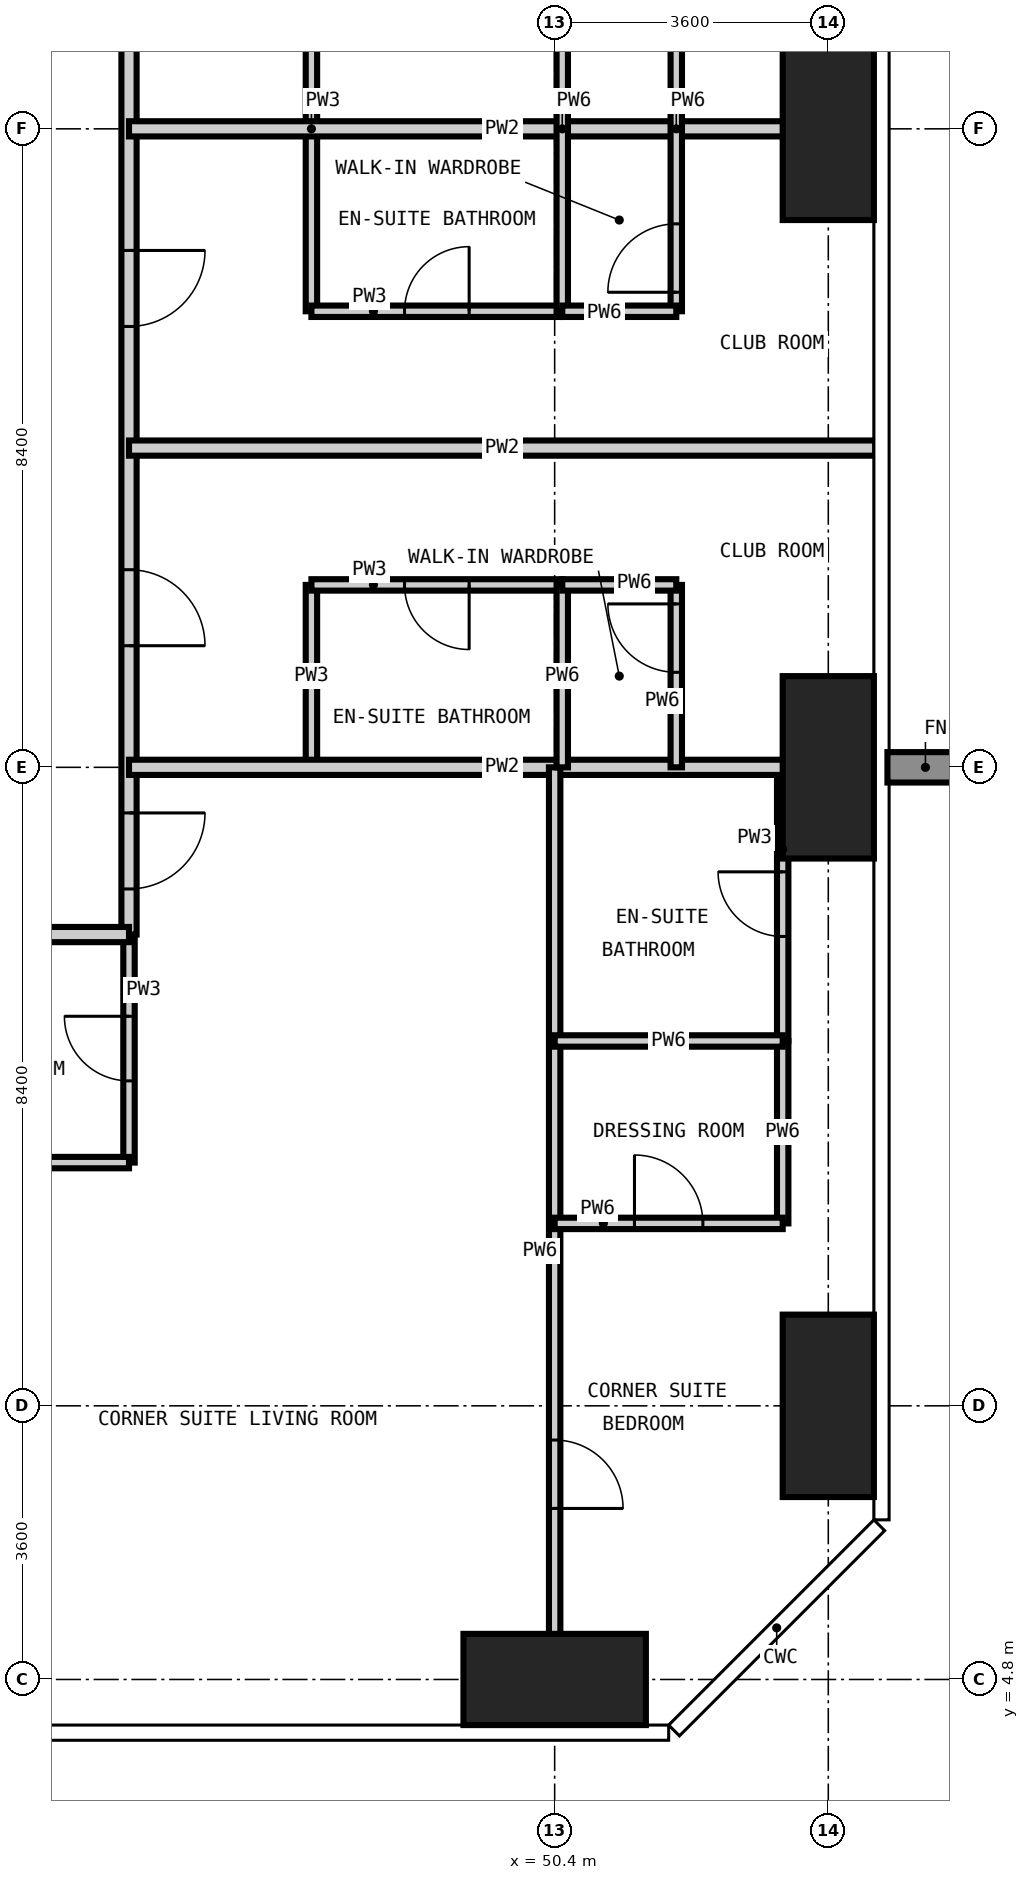
"""IFC4 building model, lengths in metres.
Left out: names, types, materials, properties, quantities, classifications, styles, units other than length and angle.
Written with IfcOpenShell. Run it as: python <this file> out.ifc"""

import sys

from ifc_helpers import new_model, si_unit, direction, frame, frame_2d, origin, origin_2d, place, context, subcontext, project, spatial, rectangle, extrude, element, fill, save


model = new_model("IFC4")
c1 = context("Model", 3, precision=1e-05, world=origin(), true_north=direction((0.0, 1.0)))
c2 = subcontext(c1, "Body", "Model", "MODEL_VIEW")
j1 = project(units=[si_unit("LENGTHUNIT", "METRE"), si_unit("PLANEANGLEUNIT", "RADIAN")], contexts=[c1])
p1 = place(None, origin())
s1 = spatial("IfcSite", under=j1, at=p1, CompositionType="ELEMENT")
p2 = place(p1, origin())
s2 = spatial("IfcBuilding", under=s1, at=p2, CompositionType="ELEMENT")
p3 = place(p2, frame((0.0, 0.0, 180.6)))
s3 = spatial("IfcBuildingStorey", under=s2, at=p3, CompositionType="ELEMENT", Elevation=180.6)
p4 = place(p3, frame((50.4, 4.8, -0.35), z_axis=(0.0, 0.0, 1.0), x_axis=(1.0, 0.0, 0.0)))
e1 = element("IfcColumn", 1, at=p4, inside=s3, PredefinedType="COLUMN", context=c2, shape_type="SweptSolid", body=[
    extrude(rectangle(XDim=2.4, YDim=1.2, at=origin_2d()), origin(), (0.0, 0.0, 1.0), 3.6),
])
for number, where, z_axis, x_axis in (
    (2, (54.0, 8.4, -0.35), (0.0, 0.0, 1.0), (1.0, 0.0, 0.0)),
    (3, (54.0, 16.8, -0.35), (0.0, 0.0, 1.0), (1.0, 0.0, 0.0)),
    (4, (54.0, 25.2, -0.35), (0.0, 0.0, 1.0), (1.0, 0.0, 0.0)),
):
    element("IfcColumn", number, at=place(p3, frame(where, z_axis=z_axis, x_axis=x_axis)), inside=s3, PredefinedType="COLUMN", context=c2, shape_type="SweptSolid", body=[
        extrude(rectangle(XDim=1.2, YDim=2.4, at=origin_2d()), origin(), (0.0, 0.0, 1.0), 3.6),
    ])
p5 = place(p3, frame((44.8, 11.6, 0.0), z_axis=(0.0, 0.0, 1.0), x_axis=(0.0, 1.0, 0.0)))
e5 = element("IfcWall", 5, at=p5, inside=s3, PredefinedType="PARTITIONING", context=c2, shape_type="SweptSolid", body=[
    extrude(rectangle(XDim=3.0, YDim=0.15, at=frame_2d((1.5, 0.0))), origin(), (0.0, 0.0, 1.0), 3.25),
])
p6 = place(p5, frame((1.075, 0.0, 0.0)))
e6 = element("IfcOpeningElement", 6, at=p6, cuts=e5, PredefinedType="OPENING", context=c2, shape_type="SweptSolid", body=[
    extrude(rectangle(XDim=0.85, YDim=2.1, at=frame_2d((0.425, 1.05))), frame((0.0, 0.085, 0.0), z_axis=(0.0, -1.0, 0.0), x_axis=(1.0, 0.0, 0.0)), (0.0, 0.0, 1.0), 0.17),
])
p7 = place(p3, frame((47.2, 16.8, 0.0), z_axis=(0.0, 0.0, 1.0), x_axis=(0.0, 1.0, 0.0)))
e7 = element("IfcWall", 7, at=p7, inside=s3, PredefinedType="PARTITIONING", context=c2, shape_type="SweptSolid", body=[
    extrude(rectangle(XDim=2.4, YDim=0.15, at=frame_2d((1.2, 0.0))), origin(), (0.0, 0.0, 1.0), 3.25),
])
p8 = place(p3, frame((47.2, 22.8, 0.0), z_axis=(0.0, 0.0, 1.0), x_axis=(0.0, 1.0, 0.0)))
e8 = element("IfcWall", 8, at=p8, inside=s3, PredefinedType="PARTITIONING", context=c2, shape_type="SweptSolid", body=[
    extrude(rectangle(XDim=4.8, YDim=0.15, at=frame_2d((2.4, 0.0))), origin(), (0.0, 0.0, 1.0), 3.25),
])
p9 = place(p3, frame((53.4, 13.2, 0.0), z_axis=(0.0, 0.0, 1.0), x_axis=(0.0, 1.0, 0.0)))
e9 = element("IfcWall", 9, at=p9, inside=s3, PredefinedType="PARTITIONING", context=c2, shape_type="SweptSolid", body=[
    extrude(rectangle(XDim=3.6, YDim=0.15, at=frame_2d((1.8, 0.0))), origin(), (0.0, 0.0, 1.0), 3.25),
])
p10 = place(p9, frame((1.375, 0.0, 0.0)))
e10 = element("IfcOpeningElement", 10, at=p10, cuts=e9, PredefinedType="OPENING", context=c2, shape_type="SweptSolid", body=[
    extrude(rectangle(XDim=0.85, YDim=2.1, at=frame_2d((0.425, 1.05))), frame((0.0, 0.085, 0.0), z_axis=(0.0, -1.0, 0.0), x_axis=(1.0, 0.0, 0.0)), (0.0, 0.0, 1.0), 0.17),
])
p11 = place(p3, frame((42.0, 11.6, 0.0), z_axis=(0.0, 0.0, 1.0), x_axis=(1.0, 0.0, 0.0)))
e11 = element("IfcWall", 11, at=p11, inside=s3, PredefinedType="PARTITIONING", context=c2, shape_type="SweptSolid", body=[
    extrude(rectangle(XDim=2.8, YDim=0.15, at=frame_2d((1.4, 0.0))), origin(), (0.0, 0.0, 1.0), 3.25),
])
p12 = place(p3, frame((47.2, 19.2, 0.0), z_axis=(0.0, 0.0, 1.0), x_axis=(1.0, 0.0, 0.0)))
e12 = element("IfcWall", 12, at=p12, inside=s3, PredefinedType="PARTITIONING", context=c2, shape_type="SweptSolid", body=[
    extrude(rectangle(XDim=3.3, YDim=0.15, at=frame_2d((1.65, 0.0))), origin(), (0.0, 0.0, 1.0), 3.25),
])
p13 = place(p12, frame((1.225, 0.0, 0.0)))
e13 = element("IfcOpeningElement", 13, at=p13, cuts=e12, PredefinedType="OPENING", context=c2, shape_type="SweptSolid", body=[
    extrude(rectangle(XDim=0.85, YDim=2.1, at=frame_2d((0.425, 1.05))), frame((0.0, 0.085, 0.0), z_axis=(0.0, -1.0, 0.0), x_axis=(1.0, 0.0, 0.0)), (0.0, 0.0, 1.0), 0.17),
])
p14 = place(p3, frame((47.2, 22.8, 0.0), z_axis=(0.0, 0.0, 1.0), x_axis=(1.0, 0.0, 0.0)))
e14 = element("IfcWall", 14, at=p14, inside=s3, PredefinedType="PARTITIONING", context=c2, shape_type="SweptSolid", body=[
    extrude(rectangle(XDim=3.3, YDim=0.15, at=frame_2d((1.65, 0.0))), origin(), (0.0, 0.0, 1.0), 3.25),
])
p15 = place(p14, frame((1.225, 0.0, 0.0)))
e15 = element("IfcOpeningElement", 15, at=p15, cuts=e14, PredefinedType="OPENING", context=c2, shape_type="SweptSolid", body=[
    extrude(rectangle(XDim=0.85, YDim=2.1, at=frame_2d((0.425, 1.05))), frame((0.0, 0.085, 0.0), z_axis=(0.0, -1.0, 0.0), x_axis=(1.0, 0.0, 0.0)), (0.0, 0.0, 1.0), 0.17),
])
p16 = place(p3, frame((44.8, 45.4, 0.0), z_axis=(0.0, 0.0, 1.0), x_axis=(0.0, -1.0, 0.0)))
e16 = element("IfcWall", 16, at=p16, inside=s3, PredefinedType="PARTITIONING", context=c2, shape_type="SweptSolid", body=[
    extrude(rectangle(XDim=30.8, YDim=0.2, at=frame_2d((15.4, 0.0))), origin(), (0.0, 0.0, 1.0), 3.25),
])
p17 = place(p16, frame((26.0, 0.0, 0.0)))
e17 = element("IfcOpeningElement", 17, at=p17, cuts=e16, PredefinedType="OPENING", context=c2, shape_type="SweptSolid", body=[
    extrude(rectangle(XDim=1.0, YDim=2.2, at=frame_2d((0.5, 1.1))), frame((0.0, 0.11, 0.0), z_axis=(0.0, -1.0, 0.0), x_axis=(1.0, 0.0, 0.0)), (0.0, 0.0, 1.0), 0.22),
])
p18 = place(p16, frame((21.8, 0.0, 0.0)))
e18 = element("IfcOpeningElement", 18, at=p18, cuts=e16, PredefinedType="OPENING", context=c2, shape_type="SweptSolid", body=[
    extrude(rectangle(XDim=1.0, YDim=2.2, at=frame_2d((0.5, 1.1))), frame((0.0, 0.11, 0.0), z_axis=(0.0, -1.0, 0.0), x_axis=(1.0, 0.0, 0.0)), (0.0, 0.0, 1.0), 0.22),
])
p19 = place(p16, frame((17.6, 0.0, 0.0)))
e19 = element("IfcOpeningElement", 19, at=p19, cuts=e16, PredefinedType="OPENING", context=c2, shape_type="SweptSolid", body=[
    extrude(rectangle(XDim=1.0, YDim=2.2, at=frame_2d((0.5, 1.1))), frame((0.0, 0.11, 0.0), z_axis=(0.0, -1.0, 0.0), x_axis=(1.0, 0.0, 0.0)), (0.0, 0.0, 1.0), 0.22),
])
p20 = place(p16, frame((13.4, 0.0, 0.0)))
e20 = element("IfcOpeningElement", 20, at=p20, cuts=e16, PredefinedType="OPENING", context=c2, shape_type="SweptSolid", body=[
    extrude(rectangle(XDim=1.0, YDim=2.2, at=frame_2d((0.5, 1.1))), frame((0.0, 0.11, 0.0), z_axis=(0.0, -1.0, 0.0), x_axis=(1.0, 0.0, 0.0)), (0.0, 0.0, 1.0), 0.22),
])
p21 = place(p16, frame((9.2, 0.0, 0.0)))
e21 = element("IfcOpeningElement", 21, at=p21, cuts=e16, PredefinedType="OPENING", context=c2, shape_type="SweptSolid", body=[
    extrude(rectangle(XDim=1.0, YDim=2.2, at=frame_2d((0.5, 1.1))), frame((0.0, 0.11, 0.0), z_axis=(0.0, -1.0, 0.0), x_axis=(1.0, 0.0, 0.0)), (0.0, 0.0, 1.0), 0.22),
])
p22 = place(p16, frame((5.0, 0.0, 0.0)))
e22 = element("IfcOpeningElement", 22, at=p22, cuts=e16, PredefinedType="OPENING", context=c2, shape_type="SweptSolid", body=[
    extrude(rectangle(XDim=1.0, YDim=2.2, at=frame_2d((0.5, 1.1))), frame((0.0, 0.11, 0.0), z_axis=(0.0, -1.0, 0.0), x_axis=(1.0, 0.0, 0.0)), (0.0, 0.0, 1.0), 0.22),
])
p23 = place(p16, frame((29.2, 0.0, 0.0)))
e23 = element("IfcOpeningElement", 23, at=p23, cuts=e16, PredefinedType="OPENING", context=c2, shape_type="SweptSolid", body=[
    extrude(rectangle(XDim=1.0, YDim=2.2, at=frame_2d((0.5, 1.1))), frame((0.0, 0.11, 0.0), z_axis=(0.0, -1.0, 0.0), x_axis=(1.0, 0.0, 0.0)), (0.0, 0.0, 1.0), 0.22),
])
p24 = place(p16, frame((1.2, 0.0, 0.0)))
e24 = element("IfcOpeningElement", 24, at=p24, cuts=e16, PredefinedType="OPENING", context=c2, shape_type="SweptSolid", body=[
    extrude(rectangle(XDim=1.0, YDim=2.2, at=frame_2d((0.5, 1.1))), frame((0.0, 0.11, 0.0), z_axis=(0.0, -1.0, 0.0), x_axis=(1.0, 0.0, 0.0)), (0.0, 0.0, 1.0), 0.22),
])
p25 = place(p3, frame((44.8, 14.6, 0.0), z_axis=(0.0, 0.0, 1.0), x_axis=(-1.0, 0.0, 0.0)))
e25 = element("IfcWall", 25, at=p25, inside=s3, PredefinedType="PARTITIONING", context=c2, shape_type="SweptSolid", body=[
    extrude(rectangle(XDim=30.2, YDim=0.2, at=frame_2d((15.1, 0.0))), origin(), (0.0, 0.0, 1.0), 3.25),
])
p26 = place(p25, frame((24.5, 0.0, 0.0)))
e26 = element("IfcOpeningElement", 26, at=p26, cuts=e25, PredefinedType="OPENING", context=c2, shape_type="SweptSolid", body=[
    extrude(rectangle(XDim=1.0, YDim=2.2, at=frame_2d((0.5, 1.1))), frame((0.0, 0.11, 0.0), z_axis=(0.0, -1.0, 0.0), x_axis=(1.0, 0.0, 0.0)), (0.0, 0.0, 1.0), 0.22),
])
p27 = place(p25, frame((13.7, 0.0, 0.0)))
e27 = element("IfcOpeningElement", 27, at=p27, cuts=e25, PredefinedType="OPENING", context=c2, shape_type="SweptSolid", body=[
    extrude(rectangle(XDim=1.0, YDim=2.2, at=frame_2d((0.5, 1.1))), frame((0.0, 0.11, 0.0), z_axis=(0.0, -1.0, 0.0), x_axis=(1.0, 0.0, 0.0)), (0.0, 0.0, 1.0), 0.22),
])
p28 = place(p25, frame((7.7, 0.0, 0.0)))
e28 = element("IfcOpeningElement", 28, at=p28, cuts=e25, PredefinedType="OPENING", context=c2, shape_type="SweptSolid", body=[
    extrude(rectangle(XDim=1.0, YDim=2.2, at=frame_2d((0.5, 1.1))), frame((0.0, 0.11, 0.0), z_axis=(0.0, -1.0, 0.0), x_axis=(1.0, 0.0, 0.0)), (0.0, 0.0, 1.0), 0.22),
])
for number, where, z_axis, x_axis in (
    (29, (44.8, 16.8, 0.0), (0.0, 0.0, 1.0), (1.0, 0.0, 0.0)),
    (30, (44.8, 21.0, 0.0), (0.0, 0.0, 1.0), (1.0, 0.0, 0.0)),
    (31, (44.8, 25.2, 0.0), (0.0, 0.0, 1.0), (1.0, 0.0, 0.0)),
):
    element("IfcWall", number, at=place(p3, frame(where, z_axis=z_axis, x_axis=x_axis)), inside=s3, PredefinedType="PARTITIONING", context=c2, shape_type="SweptSolid", body=[
        extrude(rectangle(XDim=9.818, YDim=0.2, at=frame_2d((4.909, 0.0))), origin(), (0.0, 0.0, 1.0), 3.25),
    ])
p29 = place(p3, frame((50.4, 4.182, 0.0), z_axis=(0.0, 0.0, 1.0), x_axis=(0.0, 1.0, 0.0)))
e32 = element("IfcWall", 32, at=p29, inside=s3, PredefinedType="PARTITIONING", context=c2, shape_type="SweptSolid", body=[
    extrude(rectangle(XDim=12.618, YDim=0.15, at=frame_2d((6.309, 0.0))), origin(), (0.0, 0.0, 1.0), 3.25),
])
p30 = place(p29, frame((2.868, 0.0, 0.0)))
e33 = element("IfcOpeningElement", 33, at=p30, cuts=e32, PredefinedType="OPENING", context=c2, shape_type="SweptSolid", body=[
    extrude(rectangle(XDim=0.9, YDim=2.1, at=frame_2d((0.45, 1.05))), frame((0.0, 0.085, 0.0), z_axis=(0.0, -1.0, 0.0), x_axis=(1.0, 0.0, 0.0)), (0.0, 0.0, 1.0), 0.17),
])
p31 = place(p3, frame((50.5, 16.8, 0.0), z_axis=(0.0, 0.0, 1.0), x_axis=(0.0, 1.0, 0.0)))
e34 = element("IfcWall", 34, at=p31, inside=s3, PredefinedType="PARTITIONING", context=c2, shape_type="SweptSolid", body=[
    extrude(rectangle(XDim=2.4, YDim=0.15, at=frame_2d((1.2, 0.0))), origin(), (0.0, 0.0, 1.0), 3.25),
])
p32 = place(p3, frame((50.5, 22.8, 0.0), z_axis=(0.0, 0.0, 1.0), x_axis=(0.0, 1.0, 0.0)))
e35 = element("IfcWall", 35, at=p32, inside=s3, PredefinedType="PARTITIONING", context=c2, shape_type="SweptSolid", body=[
    extrude(rectangle(XDim=4.8, YDim=0.15, at=frame_2d((2.4, 0.0))), origin(), (0.0, 0.0, 1.0), 3.25),
])
p33 = place(p3, frame((52.0, 16.8, 0.0), z_axis=(0.0, 0.0, 1.0), x_axis=(0.0, 1.0, 0.0)))
e36 = element("IfcWall", 36, at=p33, inside=s3, PredefinedType="PARTITIONING", context=c2, shape_type="SweptSolid", body=[
    extrude(rectangle(XDim=2.4, YDim=0.15, at=frame_2d((1.2, 0.0))), origin(), (0.0, 0.0, 1.0), 3.25),
])
p34 = place(p33, frame((1.25, 0.0, 0.0)))
e37 = element("IfcOpeningElement", 37, at=p34, cuts=e36, PredefinedType="OPENING", context=c2, shape_type="SweptSolid", body=[
    extrude(rectangle(XDim=0.9, YDim=2.1, at=frame_2d((0.45, 1.05))), frame((0.0, 0.085, 0.0), z_axis=(0.0, -1.0, 0.0), x_axis=(1.0, 0.0, 0.0)), (0.0, 0.0, 1.0), 0.17),
])
p35 = place(p3, frame((52.0, 22.8, 0.0), z_axis=(0.0, 0.0, 1.0), x_axis=(0.0, 1.0, 0.0)))
e38 = element("IfcWall", 38, at=p35, inside=s3, PredefinedType="PARTITIONING", context=c2, shape_type="SweptSolid", body=[
    extrude(rectangle(XDim=4.8, YDim=0.15, at=frame_2d((2.4, 0.0))), origin(), (0.0, 0.0, 1.0), 3.25),
])
p36 = place(p35, frame((0.25, 0.0, 0.0)))
e39 = element("IfcOpeningElement", 39, at=p36, cuts=e38, PredefinedType="OPENING", context=c2, shape_type="SweptSolid", body=[
    extrude(rectangle(XDim=0.9, YDim=2.1, at=frame_2d((0.45, 1.05))), frame((0.0, 0.085, 0.0), z_axis=(0.0, -1.0, 0.0), x_axis=(1.0, 0.0, 0.0)), (0.0, 0.0, 1.0), 0.17),
])
p37 = place(p35, frame((3.65, 0.0, 0.0)))
e40 = element("IfcOpeningElement", 40, at=p37, cuts=e38, PredefinedType="OPENING", context=c2, shape_type="SweptSolid", body=[
    extrude(rectangle(XDim=0.9, YDim=2.1, at=frame_2d((0.45, 1.05))), frame((0.0, 0.085, 0.0), z_axis=(0.0, -1.0, 0.0), x_axis=(1.0, 0.0, 0.0)), (0.0, 0.0, 1.0), 0.17),
])
p38 = place(p3, frame((53.4, 10.8, 0.0), z_axis=(0.0, 0.0, 1.0), x_axis=(0.0, 1.0, 0.0)))
e41 = element("IfcWall", 41, at=p38, inside=s3, PredefinedType="PARTITIONING", context=c2, shape_type="SweptSolid", body=[
    extrude(rectangle(XDim=2.4, YDim=0.15, at=frame_2d((1.2, 0.0))), origin(), (0.0, 0.0, 1.0), 3.25),
])
p39 = place(p3, frame((50.4, 10.8, 0.0), z_axis=(0.0, 0.0, 1.0), x_axis=(1.0, 0.0, 0.0)))
e42 = element("IfcWall", 42, at=p39, inside=s3, PredefinedType="PARTITIONING", context=c2, shape_type="SweptSolid", body=[
    extrude(rectangle(XDim=3.0, YDim=0.15, at=frame_2d((1.5, 0.0))), origin(), (0.0, 0.0, 1.0), 3.25),
])
p40 = place(p39, frame((1.05, 0.0, 0.0)))
e43 = element("IfcOpeningElement", 43, at=p40, cuts=e42, PredefinedType="OPENING", context=c2, shape_type="SweptSolid", body=[
    extrude(rectangle(XDim=0.9, YDim=2.1, at=frame_2d((0.45, 1.05))), frame((0.0, 0.085, 0.0), z_axis=(0.0, -1.0, 0.0), x_axis=(1.0, 0.0, 0.0)), (0.0, 0.0, 1.0), 0.17),
])
p41 = place(p3, frame((50.4, 13.2, 0.0), z_axis=(0.0, 0.0, 1.0), x_axis=(1.0, 0.0, 0.0)))
e44 = element("IfcWall", 44, at=p41, inside=s3, PredefinedType="PARTITIONING", context=c2, shape_type="SweptSolid", body=[
    extrude(rectangle(XDim=3.0, YDim=0.15, at=frame_2d((1.5, 0.0))), origin(), (0.0, 0.0, 1.0), 3.25),
])
for number, where, z_axis, x_axis in (
    (45, (50.5, 19.2, 0.0), (0.0, 0.0, 1.0), (1.0, 0.0, 0.0)),
    (46, (50.5, 22.8, 0.0), (0.0, 0.0, 1.0), (1.0, 0.0, 0.0)),
):
    element("IfcWall", number, at=place(p3, frame(where, z_axis=z_axis, x_axis=x_axis)), inside=s3, PredefinedType="PARTITIONING", context=c2, shape_type="SweptSolid", body=[
        extrude(rectangle(XDim=1.5, YDim=0.15, at=frame_2d((0.75, 0.0))), origin(), (0.0, 0.0, 1.0), 3.25),
    ])
p42 = place(p17, origin())
e47 = element("IfcDoor", 47, at=p42, inside=s3, OperationType="SINGLE_SWING_RIGHT", PredefinedType="DOOR", context=c2, shape_type="SweptSolid", body=[
    extrude(rectangle(XDim=1.0, YDim=2.2, at=frame_2d((0.5, 1.1))), frame((0.0, 0.025, 0.0), z_axis=(0.0, -1.0, 0.0), x_axis=(1.0, 0.0, 0.0)), (0.0, 0.0, 1.0), 0.05),
])
fill(e17, e47)
p43 = place(p13, frame((0.85, 0.0, 0.0), z_axis=(0.0, 0.0, 1.0), x_axis=(-1.0, 0.0, 0.0)))
e48 = element("IfcDoor", 48, at=p43, inside=s3, OperationType="SINGLE_SWING_LEFT", PredefinedType="DOOR", context=c2, shape_type="SweptSolid", body=[
    extrude(rectangle(XDim=0.85, YDim=2.1, at=frame_2d((0.425, 1.05))), frame((0.0, 0.025, 0.0), z_axis=(0.0, -1.0, 0.0), x_axis=(1.0, 0.0, 0.0)), (0.0, 0.0, 1.0), 0.05),
])
fill(e13, e48)
p44 = place(p34, origin())
e49 = element("IfcDoor", 49, at=p44, inside=s3, OperationType="SINGLE_SWING_RIGHT", PredefinedType="DOOR", context=c2, shape_type="SweptSolid", body=[
    extrude(rectangle(XDim=0.9, YDim=2.1, at=frame_2d((0.45, 1.05))), frame((0.0, 0.025, 0.0), z_axis=(0.0, -1.0, 0.0), x_axis=(1.0, 0.0, 0.0)), (0.0, 0.0, 1.0), 0.05),
])
fill(e37, e49)
p45 = place(p18, origin())
e50 = element("IfcDoor", 50, at=p45, inside=s3, OperationType="SINGLE_SWING_LEFT", PredefinedType="DOOR", context=c2, shape_type="SweptSolid", body=[
    extrude(rectangle(XDim=1.0, YDim=2.2, at=frame_2d((0.5, 1.1))), frame((0.0, 0.025, 0.0), z_axis=(0.0, -1.0, 0.0), x_axis=(1.0, 0.0, 0.0)), (0.0, 0.0, 1.0), 0.05),
])
fill(e18, e50)
p46 = place(p15, origin())
e51 = element("IfcDoor", 51, at=p46, inside=s3, OperationType="SINGLE_SWING_RIGHT", PredefinedType="DOOR", context=c2, shape_type="SweptSolid", body=[
    extrude(rectangle(XDim=0.85, YDim=2.1, at=frame_2d((0.425, 1.05))), frame((0.0, 0.025, 0.0), z_axis=(0.0, -1.0, 0.0), x_axis=(1.0, 0.0, 0.0)), (0.0, 0.0, 1.0), 0.05),
])
fill(e15, e51)
p47 = place(p36, origin())
e52 = element("IfcDoor", 52, at=p47, inside=s3, OperationType="SINGLE_SWING_LEFT", PredefinedType="DOOR", context=c2, shape_type="SweptSolid", body=[
    extrude(rectangle(XDim=0.9, YDim=2.1, at=frame_2d((0.45, 1.05))), frame((0.0, 0.025, 0.0), z_axis=(0.0, -1.0, 0.0), x_axis=(1.0, 0.0, 0.0)), (0.0, 0.0, 1.0), 0.05),
])
fill(e39, e52)
p48 = place(p23, origin())
e53 = element("IfcDoor", 53, at=p48, inside=s3, OperationType="SINGLE_SWING_LEFT", PredefinedType="DOOR", context=c2, shape_type="SweptSolid", body=[
    extrude(rectangle(XDim=1.0, YDim=2.2, at=frame_2d((0.5, 1.1))), frame((0.0, 0.025, 0.0), z_axis=(0.0, -1.0, 0.0), x_axis=(1.0, 0.0, 0.0)), (0.0, 0.0, 1.0), 0.05),
])
fill(e23, e53)
p49 = place(p6, origin())
e54 = element("IfcDoor", 54, at=p49, inside=s3, OperationType="SINGLE_SWING_RIGHT", PredefinedType="DOOR", context=c2, shape_type="SweptSolid", body=[
    extrude(rectangle(XDim=0.85, YDim=2.1, at=frame_2d((0.425, 1.05))), frame((0.0, 0.025, 0.0), z_axis=(0.0, -1.0, 0.0), x_axis=(1.0, 0.0, 0.0)), (0.0, 0.0, 1.0), 0.05),
])
fill(e6, e54)
p50 = place(p30, frame((0.9, 0.0, 0.0), z_axis=(0.0, 0.0, 1.0), x_axis=(-1.0, 0.0, 0.0)))
e55 = element("IfcDoor", 55, at=p50, inside=s3, OperationType="SINGLE_SWING_RIGHT", PredefinedType="DOOR", context=c2, shape_type="SweptSolid", body=[
    extrude(rectangle(XDim=0.9, YDim=2.1, at=frame_2d((0.45, 1.05))), frame((0.0, 0.025, 0.0), z_axis=(0.0, -1.0, 0.0), x_axis=(1.0, 0.0, 0.0)), (0.0, 0.0, 1.0), 0.05),
])
fill(e33, e55)
p51 = place(p10, origin())
e56 = element("IfcDoor", 56, at=p51, inside=s3, OperationType="SINGLE_SWING_RIGHT", PredefinedType="DOOR", context=c2, shape_type="SweptSolid", body=[
    extrude(rectangle(XDim=0.85, YDim=2.1, at=frame_2d((0.425, 1.05))), frame((0.0, 0.025, 0.0), z_axis=(0.0, -1.0, 0.0), x_axis=(1.0, 0.0, 0.0)), (0.0, 0.0, 1.0), 0.05),
])
fill(e10, e56)
p52 = place(p40, origin())
e57 = element("IfcDoor", 57, at=p52, inside=s3, OperationType="SINGLE_SWING_LEFT", PredefinedType="DOOR", context=c2, shape_type="SweptSolid", body=[
    extrude(rectangle(XDim=0.9, YDim=2.1, at=frame_2d((0.45, 1.05))), frame((0.0, 0.025, 0.0), z_axis=(0.0, -1.0, 0.0), x_axis=(1.0, 0.0, 0.0)), (0.0, 0.0, 1.0), 0.05),
])
fill(e43, e57)
save(model, sys.argv[1])
